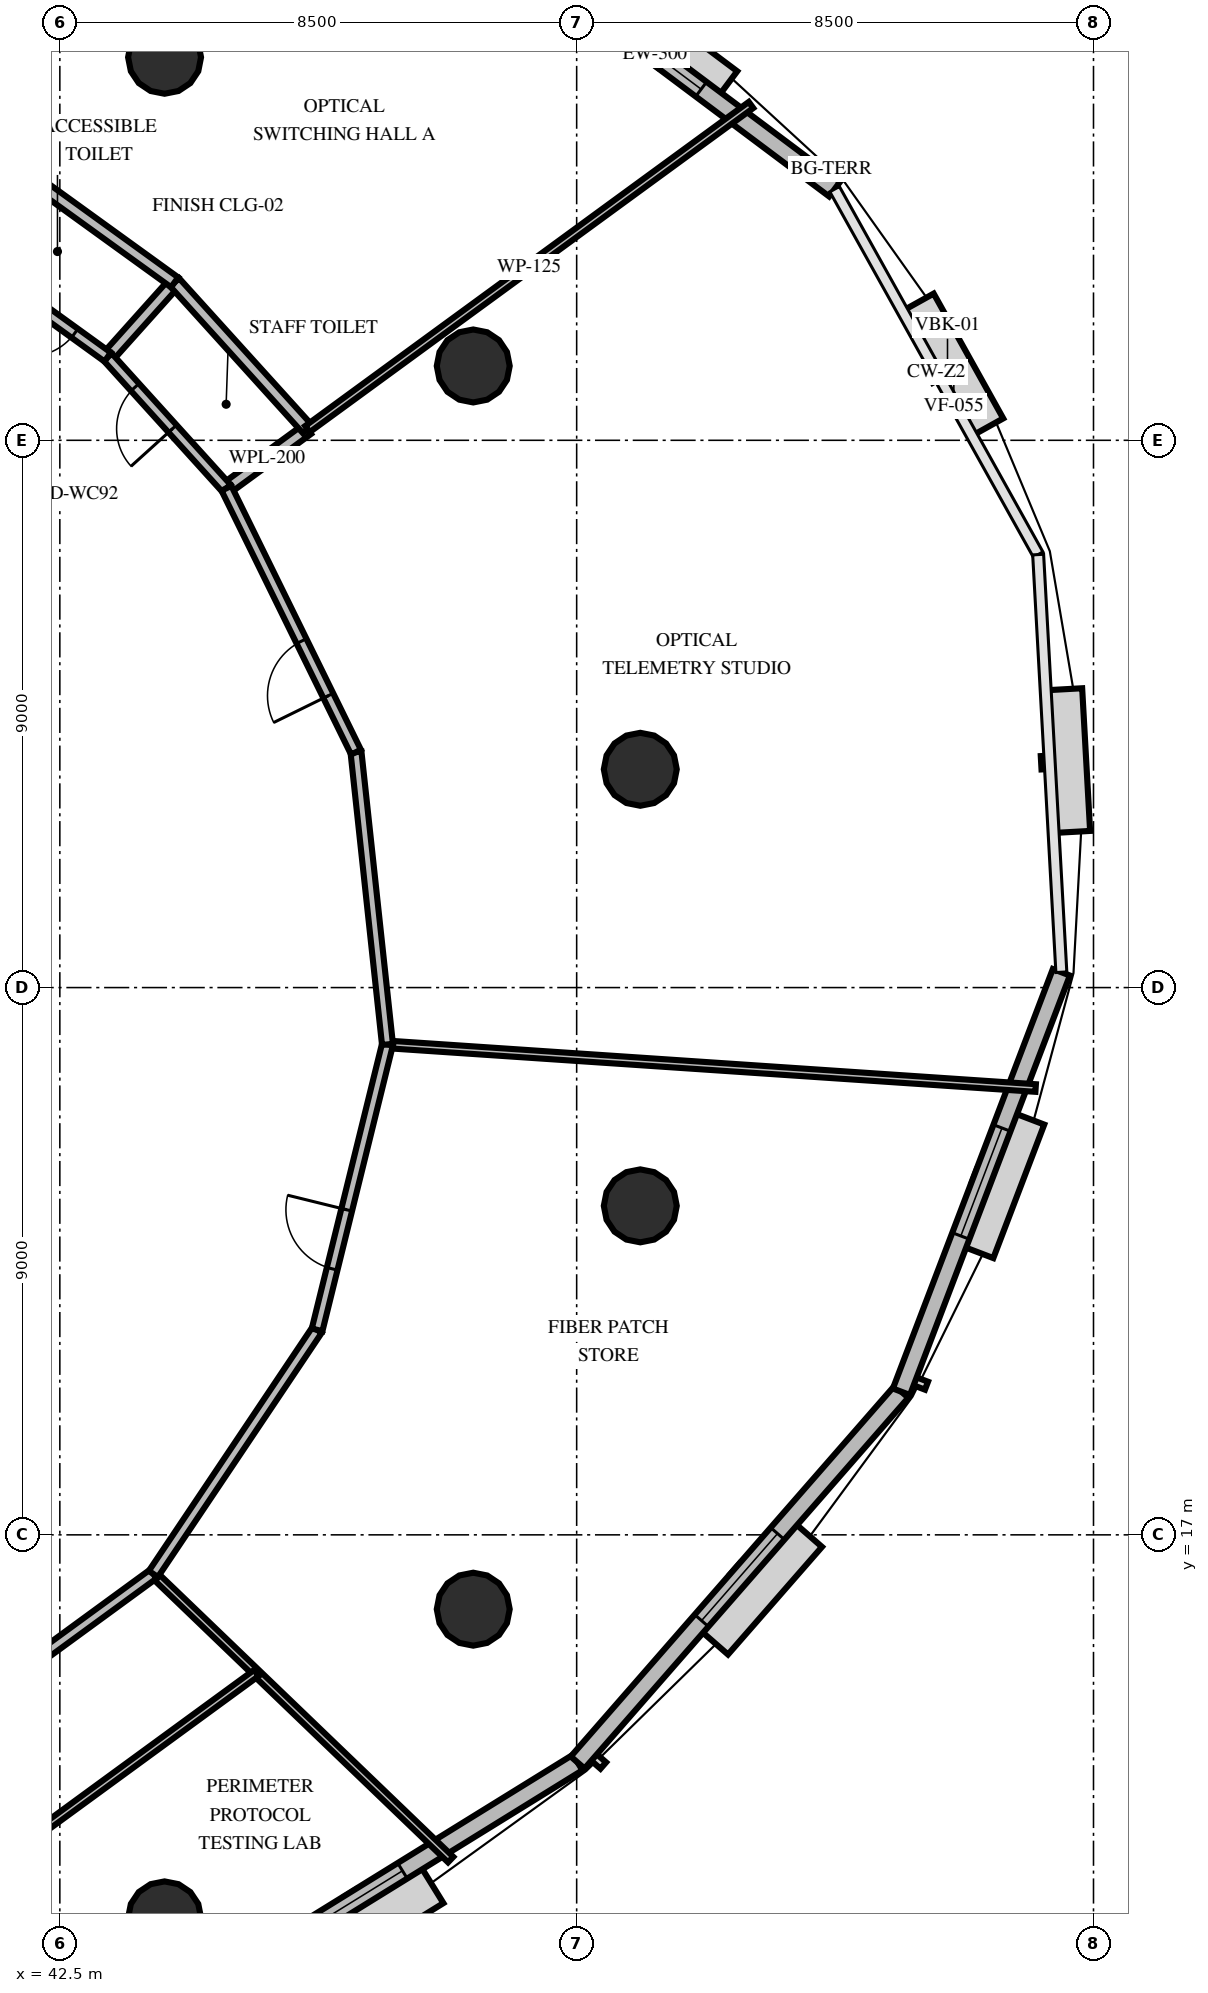
"""IFC4 building model, lengths in metres.
Left out: names, types, materials, properties, quantities, classifications, styles, units other than length and angle.
Written with IfcOpenShell. Run it as: python <this file> out.ifc"""

import sys

from ifc_helpers import new_model, si_unit, direction, frame, frame_2d, origin, origin_2d, place, context, subcontext, project, spatial, rectangle, circle, extrude, element, fill, save


model = new_model("IFC4")
c1 = context("Model", 3, precision=1e-05, world=origin(), true_north=direction((0.0, 1.0)))
c2 = subcontext(c1, "Body", "Model", "MODEL_VIEW")
j1 = project(units=[si_unit("LENGTHUNIT", "METRE"), si_unit("PLANEANGLEUNIT", "RADIAN")], contexts=[c1])
p1 = place(None, origin())
s1 = spatial("IfcSite", under=j1, at=p1, CompositionType="ELEMENT")
p2 = place(p1, origin())
s2 = spatial("IfcBuilding", under=s1, at=p2, CompositionType="ELEMENT")
p3 = place(p2, frame((0.0, 0.0, 101.8)))
s3 = spatial("IfcBuildingStorey", under=s2, at=p3, CompositionType="ELEMENT", Elevation=101.8)
for number, where, z_axis, x_axis in (
    (1, (52.046, 29.59, 0.0), (0.0, 0.0, 1.0), (1.0, 0.0, 0.0)),
    (2, (49.299, 36.222, 0.0), (0.0, 0.0, 1.0), (1.0, 0.0, 0.0)),
    (3, (44.222, 41.299, 0.0), (0.0, 0.0, 1.0), (1.0, 0.0, 0.0)),
    (4, (44.222, 10.701, 0.0), (0.0, 0.0, 1.0), (1.0, 0.0, 0.0)),
    (5, (49.299, 15.778, 0.0), (0.0, 0.0, 1.0), (1.0, 0.0, 0.0)),
    (6, (52.046, 22.41, 0.0), (0.0, 0.0, 1.0), (1.0, 0.0, 0.0)),
):
    element("IfcColumn", number, at=place(p3, frame(where, z_axis=z_axis, x_axis=x_axis)), inside=s3, PredefinedType="COLUMN", context=c2, shape_type="SweptSolid", body=[
        extrude(circle(Radius=0.6, at=origin_2d()), origin(), (0.0, 0.0, 1.0), 4.0),
    ])
p4 = place(p3, frame((55.242, 39.13, 0.0), z_axis=(0.0, 0.0, 1.0), x_axis=(-0.80042041599, 0.599439035821, 0.0)))
e7 = element("IfcWall", 7, at=p4, inside=s3, PredefinedType="SOLIDWALL", context=c2, shape_type="SweptSolid", body=[
    extrude(rectangle(XDim=7.383, YDim=0.3, at=frame_2d((3.692, 0.0))), origin(), (0.0, 0.0, 1.0), 2.9),
])
p5 = place(p4, frame((2.742, 0.0, 0.8)))
e8 = element("IfcOpeningElement", 8, at=p5, cuts=e7, PredefinedType="OPENING", context=c2, shape_type="SweptSolid", body=[
    extrude(rectangle(XDim=1.9, YDim=1.95, at=frame_2d((0.95, 0.975))), frame((0.0, 0.16, 0.0), z_axis=(0.0, -1.0, 0.0), x_axis=(1.0, 0.0, 0.0)), (0.0, 0.0, 1.0), 0.32),
])
p6 = place(p3, frame((43.639, 8.696, 0.0), z_axis=(0.0, 0.0, 1.0), x_axis=(0.850622495696, 0.5257769202, 0.0)))
e9 = element("IfcWall", 9, at=p6, inside=s3, PredefinedType="SOLIDWALL", context=c2, shape_type="SweptSolid", body=[
    extrude(rectangle(XDim=8.673, YDim=0.3, at=frame_2d((4.336, 0.0))), origin(), (0.0, 0.0, 1.0), 2.9),
])
p7 = place(p6, frame((3.386, 0.0, 0.8)))
e10 = element("IfcOpeningElement", 10, at=p7, cuts=e9, PredefinedType="OPENING", context=c2, shape_type="SweptSolid", body=[
    extrude(rectangle(XDim=1.9, YDim=1.95, at=frame_2d((0.95, 0.975))), frame((0.0, 0.16, 0.0), z_axis=(0.0, -1.0, 0.0), x_axis=(1.0, 0.0, 0.0)), (0.0, 0.0, 1.0), 0.32),
])
p8 = place(p3, frame((51.016, 13.256, 0.0), z_axis=(0.0, 0.0, 1.0), x_axis=(0.657799717716, 0.753192891212, 0.0)))
e11 = element("IfcWall", 11, at=p8, inside=s3, PredefinedType="SOLIDWALL", context=c2, shape_type="SweptSolid", body=[
    extrude(rectangle(XDim=8.095, YDim=0.3, at=frame_2d((4.048, 0.0))), origin(), (0.0, 0.0, 1.0), 2.9),
])
p9 = place(p8, frame((3.098, 0.0, 0.8)))
e12 = element("IfcOpeningElement", 12, at=p9, cuts=e11, PredefinedType="OPENING", context=c2, shape_type="SweptSolid", body=[
    extrude(rectangle(XDim=1.9, YDim=1.95, at=frame_2d((0.95, 0.975))), frame((0.0, 0.16, 0.0), z_axis=(0.0, -1.0, 0.0), x_axis=(1.0, 0.0, 0.0)), (0.0, 0.0, 1.0), 0.32),
])
p10 = place(p3, frame((56.341, 19.353, 0.0), z_axis=(0.0, 0.0, 1.0), x_axis=(0.356227700277, 0.934399178914, 0.0)))
e13 = element("IfcWall", 13, at=p10, inside=s3, PredefinedType="SOLIDWALL", context=c2, shape_type="SweptSolid", body=[
    extrude(rectangle(XDim=7.383, YDim=0.3, at=frame_2d((3.692, 0.0))), origin(), (0.0, 0.0, 1.0), 2.9),
])
p11 = place(p10, frame((2.742, 0.0, 0.8)))
e14 = element("IfcOpeningElement", 14, at=p11, cuts=e13, PredefinedType="OPENING", context=c2, shape_type="SweptSolid", body=[
    extrude(rectangle(XDim=1.9, YDim=1.95, at=frame_2d((0.95, 0.975))), frame((0.0, 0.16, 0.0), z_axis=(0.0, -1.0, 0.0), x_axis=(1.0, 0.0, 0.0)), (0.0, 0.0, 1.0), 0.32),
])
p12 = place(p3, frame((45.24, 34.211, 0.0), z_axis=(0.0, 0.0, 1.0), x_axis=(0.807499537158, 0.58986820349, 0.0)))
e15 = element("IfcWall", 15, at=p12, inside=s3, PredefinedType="PLUMBINGWALL", context=c2, shape_type="SweptSolid", body=[
    extrude(rectangle(XDim=1.65, YDim=0.2, at=frame_2d((0.825, 0.0))), origin(), (0.0, 0.0, 1.0), 2.8),
])
p13 = place(p3, frame((43.287, 36.369, 0.0), z_axis=(0.0, 0.0, 1.0), x_axis=(0.667197013262, 0.744881296244, 0.0)))
e16 = element("IfcWall", 16, at=p13, inside=s3, PredefinedType="PLUMBINGWALL", context=c2, shape_type="SweptSolid", body=[
    extrude(rectangle(XDim=1.65, YDim=0.2, at=frame_2d((0.825, 0.0))), origin(), (0.0, 0.0, 1.0), 2.8),
])
p14 = place(p3, frame((46.573, 35.185, 0.0), z_axis=(0.0, 0.0, 1.0), x_axis=(-0.671133255477, 0.741336734145, 0.0)))
e17 = element("IfcWall", 17, at=p14, inside=s3, PredefinedType="PLUMBINGWALL", context=c2, shape_type="SweptSolid", body=[
    extrude(rectangle(XDim=3.255, YDim=0.2, at=frame_2d((1.627, 0.0))), origin(), (0.0, 0.0, 1.0), 2.8),
])
p15 = place(p3, frame((45.24, 34.211, 0.0), z_axis=(0.0, 0.0, 1.0), x_axis=(-0.671080261141, 0.741384706551, 0.0)))
e18 = element("IfcWall", 18, at=p15, inside=s3, PredefinedType="PARTITIONING", context=c2, shape_type="SweptSolid", body=[
    extrude(rectangle(XDim=2.91, YDim=0.18, at=frame_2d((1.455, 0.0))), origin(), (0.0, 0.0, 1.0), 2.8),
])
p16 = place(p15, frame((1.321, 0.0, 0.0)))
e19 = element("IfcOpeningElement", 19, at=p16, cuts=e18, PredefinedType="OPENING", context=c2, shape_type="SweptSolid", body=[
    extrude(rectangle(XDim=0.92, YDim=2.1, at=frame_2d((0.46, 1.05))), frame((0.0, 0.1, 0.0), z_axis=(0.0, -1.0, 0.0), x_axis=(1.0, 0.0, 0.0)), (0.0, 0.0, 1.0), 0.2),
])
p17 = place(p3, frame((44.388, 37.598, 0.0), z_axis=(0.0, 0.0, 1.0), x_axis=(-0.810513057076, 0.585720568453, 0.0)))
e20 = element("IfcWall", 20, at=p17, inside=s3, PredefinedType="PLUMBINGWALL", context=c2, shape_type="SweptSolid", body=[
    extrude(rectangle(XDim=3.255, YDim=0.2, at=frame_2d((1.627, 0.0))), origin(), (0.0, 0.0, 1.0), 2.8),
])
p18 = place(p3, frame((43.287, 36.369, 0.0), z_axis=(0.0, 0.0, 1.0), x_axis=(-0.81053540368, 0.585689644249, 0.0)))
e21 = element("IfcWall", 21, at=p18, inside=s3, PredefinedType="PARTITIONING", context=c2, shape_type="SweptSolid", body=[
    extrude(rectangle(XDim=2.91, YDim=0.18, at=frame_2d((1.455, 0.0))), origin(), (0.0, 0.0, 1.0), 2.8),
])
p19 = place(p18, frame((0.669, 0.0, 0.0)))
e22 = element("IfcOpeningElement", 22, at=p19, cuts=e21, PredefinedType="OPENING", context=c2, shape_type="SweptSolid", body=[
    extrude(rectangle(XDim=0.92, YDim=2.1, at=frame_2d((0.46, 1.05))), frame((0.0, 0.1, 0.0), z_axis=(0.0, -1.0, 0.0), x_axis=(1.0, 0.0, 0.0)), (0.0, 0.0, 1.0), 0.2),
])
p20 = place(p3, frame((46.573, 35.185, 0.0), z_axis=(0.0, 0.0, 1.0), x_axis=(0.807463902346, 0.589916982641, 0.0)))
e23 = element("IfcWall", 23, at=p20, inside=s3, PredefinedType="PARTITIONING", context=c2, shape_type="SweptSolid", body=[
    extrude(rectangle(XDim=9.034, YDim=0.125, at=frame_2d((4.517, 0.0))), origin(), (0.0, 0.0, 1.0), 2.8),
])
p21 = place(p3, frame((44.039, 16.357, 0.0), z_axis=(0.0, 0.0, 1.0), x_axis=(0.721151976703, -0.692776895181, 0.0)))
e24 = element("IfcWall", 24, at=p21, inside=s3, PredefinedType="PARTITIONING", context=c2, shape_type="SweptSolid", body=[
    extrude(rectangle(XDim=6.78, YDim=0.125, at=frame_2d((3.39, 0.0))), origin(), (0.0, 0.0, 1.0), 2.8),
])
p22 = place(p3, frame((40.135, 13.505, 0.0), z_axis=(0.0, 0.0, 1.0), x_axis=(0.807469765086, 0.589908957782, 0.0)))
e25 = element("IfcWall", 25, at=p22, inside=s3, PredefinedType="PARTITIONING", context=c2, shape_type="SweptSolid", body=[
    extrude(rectangle(XDim=4.834, YDim=0.18, at=frame_2d((2.417, 0.0))), origin(), (0.0, 0.0, 1.0), 2.8),
])
p23 = place(p3, frame((41.171, 11.395, 0.0), z_axis=(0.0, 0.0, 1.0), x_axis=(0.807465531415, 0.589914752805, 0.0)))
e26 = element("IfcWall", 26, at=p23, inside=s3, PredefinedType="PARTITIONING", context=c2, shape_type="SweptSolid", body=[
    extrude(rectangle(XDim=5.65, YDim=0.125, at=frame_2d((2.825, 0.0))), origin(), (0.0, 0.0, 1.0), 2.8),
])
p24 = place(p3, frame((47.889, 25.065, 0.0), z_axis=(0.0, 0.0, 1.0), x_axis=(0.997743814869, -0.067136278499, 0.0)))
e27 = element("IfcWall", 27, at=p24, inside=s3, PredefinedType="PARTITIONING", context=c2, shape_type="SweptSolid", body=[
    extrude(rectangle(XDim=10.684, YDim=0.125, at=frame_2d((5.342, 0.0))), origin(), (0.0, 0.0, 1.0), 2.8),
])
p25 = place(p3, frame((44.039, 16.357, 0.0), z_axis=(0.0, 0.0, 1.0), x_axis=(0.556994013801, 0.830516507114, 0.0)))
e28 = element("IfcWall", 28, at=p25, inside=s3, PredefinedType="PARTITIONING", context=c2, shape_type="SweptSolid", body=[
    extrude(rectangle(XDim=4.834, YDim=0.18, at=frame_2d((2.417, 0.0))), origin(), (0.0, 0.0, 1.0), 2.8),
])
p26 = place(p3, frame((46.731, 20.372, 0.0), z_axis=(0.0, 0.0, 1.0), x_axis=(0.239432930516, 0.970912906385, 0.0)))
e29 = element("IfcWall", 29, at=p26, inside=s3, PredefinedType="PARTITIONING", context=c2, shape_type="SweptSolid", body=[
    extrude(rectangle(XDim=4.834, YDim=0.18, at=frame_2d((2.417, 0.0))), origin(), (0.0, 0.0, 1.0), 2.8),
])
p27 = place(p26, frame((1.034, 0.0, 0.0)))
e30 = element("IfcOpeningElement", 30, at=p27, cuts=e29, PredefinedType="OPENING", context=c2, shape_type="SweptSolid", body=[
    extrude(rectangle(XDim=1.0, YDim=2.15, at=frame_2d((0.5, 1.075))), frame((0.0, 0.1, 0.0), z_axis=(0.0, -1.0, 0.0), x_axis=(1.0, 0.0, 0.0)), (0.0, 0.0, 1.0), 0.2),
])
p28 = place(p3, frame((47.889, 25.065, 0.0), z_axis=(0.0, 0.0, 1.0), x_axis=(-0.107160752917, 0.994241707551, 0.0)))
e31 = element("IfcWall", 31, at=p28, inside=s3, PredefinedType="PARTITIONING", context=c2, shape_type="SweptSolid", body=[
    extrude(rectangle(XDim=4.834, YDim=0.18, at=frame_2d((2.417, 0.0))), origin(), (0.0, 0.0, 1.0), 2.8),
])
p29 = place(p3, frame((47.371, 29.872, 0.0), z_axis=(0.0, 0.0, 1.0), x_axis=(-0.44071758316, 0.897645816508, 0.0)))
e32 = element("IfcWall", 32, at=p29, inside=s3, PredefinedType="PARTITIONING", context=c2, shape_type="SweptSolid", body=[
    extrude(rectangle(XDim=4.834, YDim=0.18, at=frame_2d((2.417, 0.0))), origin(), (0.0, 0.0, 1.0), 2.8),
])
p30 = place(p29, frame((1.034, 0.0, 0.0)))
e33 = element("IfcOpeningElement", 33, at=p30, cuts=e32, PredefinedType="OPENING", context=c2, shape_type="SweptSolid", body=[
    extrude(rectangle(XDim=1.0, YDim=2.15, at=frame_2d((0.5, 1.075))), frame((0.0, 0.1, 0.0), z_axis=(0.0, -1.0, 0.0), x_axis=(1.0, 0.0, 0.0)), (0.0, 0.0, 1.0), 0.2),
])
p31 = place(p5, origin())
e34 = element("IfcWindow", 34, at=p31, inside=s3, PartitioningType="SINGLE_PANEL", PredefinedType="WINDOW", context=c2, shape_type="SweptSolid", body=[
    extrude(rectangle(XDim=1.9, YDim=1.95, at=frame_2d((0.95, 0.975))), frame((0.0, 0.03, 0.0), z_axis=(0.0, -1.0, 0.0), x_axis=(1.0, 0.0, 0.0)), (0.0, 0.0, 1.0), 0.06),
])
fill(e8, e34)
p32 = place(p7, origin())
e35 = element("IfcWindow", 35, at=p32, inside=s3, PartitioningType="SINGLE_PANEL", PredefinedType="WINDOW", context=c2, shape_type="SweptSolid", body=[
    extrude(rectangle(XDim=1.9, YDim=1.95, at=frame_2d((0.95, 0.975))), frame((0.0, 0.03, 0.0), z_axis=(0.0, -1.0, 0.0), x_axis=(1.0, 0.0, 0.0)), (0.0, 0.0, 1.0), 0.06),
])
fill(e10, e35)
p33 = place(p9, origin())
e36 = element("IfcWindow", 36, at=p33, inside=s3, PartitioningType="SINGLE_PANEL", PredefinedType="WINDOW", context=c2, shape_type="SweptSolid", body=[
    extrude(rectangle(XDim=1.9, YDim=1.95, at=frame_2d((0.95, 0.975))), frame((0.0, 0.03, 0.0), z_axis=(0.0, -1.0, 0.0), x_axis=(1.0, 0.0, 0.0)), (0.0, 0.0, 1.0), 0.06),
])
fill(e12, e36)
p34 = place(p11, origin())
e37 = element("IfcWindow", 37, at=p34, inside=s3, PartitioningType="SINGLE_PANEL", PredefinedType="WINDOW", context=c2, shape_type="SweptSolid", body=[
    extrude(rectangle(XDim=1.9, YDim=1.95, at=frame_2d((0.95, 0.975))), frame((0.0, 0.03, 0.0), z_axis=(0.0, -1.0, 0.0), x_axis=(1.0, 0.0, 0.0)), (0.0, 0.0, 1.0), 0.06),
])
fill(e14, e37)
p35 = place(p16, origin())
e38 = element("IfcDoor", 38, at=p35, inside=s3, OperationType="SINGLE_SWING_LEFT", PredefinedType="DOOR", context=c2, shape_type="SweptSolid", body=[
    extrude(rectangle(XDim=0.92, YDim=2.1, at=frame_2d((0.46, 1.05))), frame((0.0, 0.025, 0.0), z_axis=(0.0, -1.0, 0.0), x_axis=(1.0, 0.0, 0.0)), (0.0, 0.0, 1.0), 0.05),
])
fill(e19, e38)
p36 = place(p19, origin())
e39 = element("IfcDoor", 39, at=p36, inside=s3, OperationType="SINGLE_SWING_RIGHT", PredefinedType="DOOR", context=c2, shape_type="SweptSolid", body=[
    extrude(rectangle(XDim=0.92, YDim=2.1, at=frame_2d((0.46, 1.05))), frame((0.0, 0.025, 0.0), z_axis=(0.0, -1.0, 0.0), x_axis=(1.0, 0.0, 0.0)), (0.0, 0.0, 1.0), 0.05),
])
fill(e22, e39)
p37 = place(p27, origin())
e40 = element("IfcDoor", 40, at=p37, inside=s3, OperationType="SINGLE_SWING_RIGHT", PredefinedType="DOOR", context=c2, shape_type="SweptSolid", body=[
    extrude(rectangle(XDim=1.0, YDim=2.15, at=frame_2d((0.5, 1.075))), frame((0.0, 0.025, 0.0), z_axis=(0.0, -1.0, 0.0), x_axis=(1.0, 0.0, 0.0)), (0.0, 0.0, 1.0), 0.05),
])
fill(e30, e40)
p38 = place(p30, origin())
e41 = element("IfcDoor", 41, at=p38, inside=s3, OperationType="SINGLE_SWING_LEFT", PredefinedType="DOOR", context=c2, shape_type="SweptSolid", body=[
    extrude(rectangle(XDim=1.0, YDim=2.15, at=frame_2d((0.5, 1.075))), frame((0.0, 0.025, 0.0), z_axis=(0.0, -1.0, 0.0), x_axis=(1.0, 0.0, 0.0)), (0.0, 0.0, 1.0), 0.05),
])
fill(e33, e41)
save(model, sys.argv[1])
